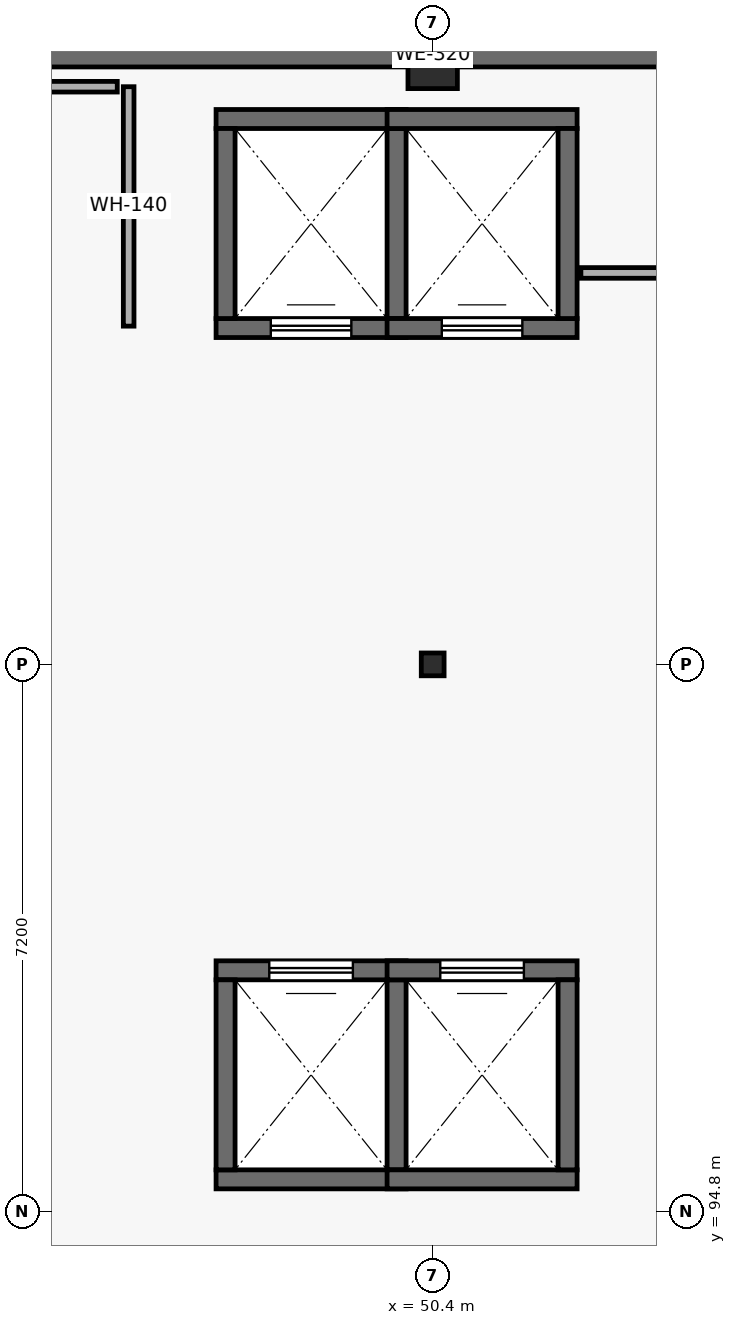
"""IFC4 building model, lengths in metres.
Left out: names, types, materials, properties, quantities, classifications, styles, units other than length and angle.
Written with IfcOpenShell. Run it as: python <this file> out.ifc"""

import sys

from ifc_helpers import new_model, si_unit, direction, frame, frame_2d, origin, origin_2d, place, context, subcontext, project, spatial, rectangle, hollow_rectangle, extrude, element, fill, save


model = new_model("IFC4")
c1 = context("Model", 3, precision=1e-05, world=origin(), true_north=direction((0.0, 1.0)))
c2 = subcontext(c1, "Body", "Model", "MODEL_VIEW")
j1 = project(units=[si_unit("LENGTHUNIT", "METRE"), si_unit("PLANEANGLEUNIT", "RADIAN")], contexts=[c1])
p1 = place(None, origin())
s1 = spatial("IfcSite", under=j1, at=p1, CompositionType="ELEMENT")
p2 = place(p1, origin())
s2 = spatial("IfcBuilding", under=s1, at=p2, CompositionType="ELEMENT")
p3 = place(p2, frame((0.0, 0.0, 44.7)))
s3 = spatial("IfcBuildingStorey", under=s2, at=p3, CompositionType="ELEMENT", Elevation=44.7)
p4 = place(p3, frame((50.4, 102.0, 0.0), z_axis=(0.0, 0.0, 1.0), x_axis=(1.0, 0.0, 0.0)))
e1 = element("IfcColumn", 1, at=p4, inside=s3, PredefinedType="COLUMN", context=c2, shape_type="SweptSolid", body=[
    extrude(hollow_rectangle(XDim=0.3, YDim=0.3, WallThickness=0.012, at=origin_2d()), origin(), (0.0, 0.0, 1.0), 4.8),
])
p5 = place(p3, frame((50.4, 109.9, 0.0), z_axis=(0.0, 0.0, 1.0), x_axis=(1.0, 0.0, 0.0)))
e2 = element("IfcColumn", 2, at=p5, inside=s3, PredefinedType="COLUMN", context=c2, shape_type="SweptSolid", body=[
    extrude(rectangle(XDim=0.65, YDim=0.65, at=origin_2d()), origin(), (0.0, 0.0, 1.0), 8.689),
])
p6 = place(p3, frame((33.6, 110.02, 0.0), z_axis=(0.0, 0.0, 1.0), x_axis=(1.0, 0.0, 0.0)))
e3 = element("IfcWall", 3, at=p6, inside=s3, PredefinedType="SOLIDWALL", context=c2, shape_type="SweptSolid", body=[
    extrude(rectangle(XDim=33.6, YDim=0.32, at=frame_2d((16.8, 0.0))), origin(), (0.0, 0.0, 1.0), 4.58),
])
p7 = place(p3, frame((47.55, 95.225, 0.0), z_axis=(0.0, 0.0, 1.0), x_axis=(1.0, 0.0, 0.0)))
e4 = element("IfcWall", 4, at=p7, inside=s3, PredefinedType="SHEAR", context=c2, shape_type="SweptSolid", body=[
    extrude(rectangle(XDim=2.5, YDim=0.25, at=frame_2d((1.25, 0.0))), origin(), (0.0, 0.0, 1.0), 4.58),
])
p8 = place(p3, frame((50.05, 97.975, 0.0), z_axis=(0.0, 0.0, 1.0), x_axis=(-1.0, 0.0, 0.0)))
e5 = element("IfcWall", 5, at=p8, inside=s3, PredefinedType="SHEAR", context=c2, shape_type="SweptSolid", body=[
    extrude(rectangle(XDim=2.5, YDim=0.25, at=frame_2d((1.25, 0.0))), origin(), (0.0, 0.0, 1.0), 4.58),
])
p9 = place(p8, frame((0.7, 0.0, 0.0)))
e6 = element("IfcOpeningElement", 6, at=p9, cuts=e5, PredefinedType="OPENING", context=c2, shape_type="SweptSolid", body=[
    extrude(rectangle(XDim=1.1, YDim=2.2, at=frame_2d((0.55, 1.1))), frame((0.0, 0.135, 0.0), z_axis=(0.0, -1.0, 0.0), x_axis=(1.0, 0.0, 0.0)), (0.0, 0.0, 1.0), 0.27),
])
for number, where, z_axis, x_axis in (
    (7, (47.675, 95.35, 0.0), (0.0, 0.0, 1.0), (0.0, 1.0, 0.0)),
    (8, (49.925, 97.85, 0.0), (0.0, 0.0, 1.0), (0.0, -1.0, 0.0)),
    (9, (49.8, 95.225, 0.0), (0.0, 0.0, 1.0), (1.0, 0.0, 0.0)),
):
    element("IfcWall", number, at=place(p3, frame(where, z_axis=z_axis, x_axis=x_axis)), inside=s3, PredefinedType="SHEAR", context=c2, shape_type="SweptSolid", body=[
        extrude(rectangle(XDim=2.5, YDim=0.25, at=frame_2d((1.25, 0.0))), origin(), (0.0, 0.0, 1.0), 4.58),
    ])
p10 = place(p3, frame((52.3, 97.975, 0.0), z_axis=(0.0, 0.0, 1.0), x_axis=(-1.0, 0.0, 0.0)))
e10 = element("IfcWall", 10, at=p10, inside=s3, PredefinedType="SHEAR", context=c2, shape_type="SweptSolid", body=[
    extrude(rectangle(XDim=2.5, YDim=0.25, at=frame_2d((1.25, 0.0))), origin(), (0.0, 0.0, 1.0), 4.58),
])
p11 = place(p10, frame((0.7, 0.0, 0.0)))
e11 = element("IfcOpeningElement", 11, at=p11, cuts=e10, PredefinedType="OPENING", context=c2, shape_type="SweptSolid", body=[
    extrude(rectangle(XDim=1.1, YDim=2.2, at=frame_2d((0.55, 1.1))), frame((0.0, 0.135, 0.0), z_axis=(0.0, -1.0, 0.0), x_axis=(1.0, 0.0, 0.0)), (0.0, 0.0, 1.0), 0.27),
])
p12 = place(p3, frame((52.175, 97.85, 0.0), z_axis=(0.0, 0.0, 1.0), x_axis=(0.0, -1.0, 0.0)))
e12 = element("IfcWall", 12, at=p12, inside=s3, PredefinedType="SHEAR", context=c2, shape_type="SweptSolid", body=[
    extrude(rectangle(XDim=2.5, YDim=0.25, at=frame_2d((1.25, 0.0))), origin(), (0.0, 0.0, 1.0), 4.58),
])
p13 = place(p3, frame((47.55, 106.425, 0.0), z_axis=(0.0, 0.0, 1.0), x_axis=(1.0, 0.0, 0.0)))
e13 = element("IfcWall", 13, at=p13, inside=s3, PredefinedType="SHEAR", context=c2, shape_type="SweptSolid", body=[
    extrude(rectangle(XDim=2.5, YDim=0.25, at=frame_2d((1.25, 0.0))), origin(), (0.0, 0.0, 1.0), 4.58),
])
p14 = place(p13, frame((0.72, 0.0, 0.0)))
e14 = element("IfcOpeningElement", 14, at=p14, cuts=e13, PredefinedType="OPENING", context=c2, shape_type="SweptSolid", body=[
    extrude(rectangle(XDim=1.06, YDim=2.2, at=frame_2d((0.53, 1.1))), frame((0.0, 0.135, 0.0), z_axis=(0.0, -1.0, 0.0), x_axis=(1.0, 0.0, 0.0)), (0.0, 0.0, 1.0), 0.27),
])
for number, where, z_axis, x_axis in (
    (15, (50.05, 109.175, 0.0), (0.0, 0.0, 1.0), (-1.0, 0.0, 0.0)),
    (16, (47.675, 106.55, 0.0), (0.0, 0.0, 1.0), (0.0, 1.0, 0.0)),
    (17, (49.925, 109.05, 0.0), (0.0, 0.0, 1.0), (0.0, -1.0, 0.0)),
):
    element("IfcWall", number, at=place(p3, frame(where, z_axis=z_axis, x_axis=x_axis)), inside=s3, PredefinedType="SHEAR", context=c2, shape_type="SweptSolid", body=[
        extrude(rectangle(XDim=2.5, YDim=0.25, at=frame_2d((1.25, 0.0))), origin(), (0.0, 0.0, 1.0), 4.58),
    ])
p15 = place(p3, frame((49.8, 106.425, 0.0), z_axis=(0.0, 0.0, 1.0), x_axis=(1.0, 0.0, 0.0)))
e18 = element("IfcWall", 18, at=p15, inside=s3, PredefinedType="SHEAR", context=c2, shape_type="SweptSolid", body=[
    extrude(rectangle(XDim=2.5, YDim=0.25, at=frame_2d((1.25, 0.0))), origin(), (0.0, 0.0, 1.0), 4.58),
])
p16 = place(p15, frame((0.72, 0.0, 0.0)))
e19 = element("IfcOpeningElement", 19, at=p16, cuts=e18, PredefinedType="OPENING", context=c2, shape_type="SweptSolid", body=[
    extrude(rectangle(XDim=1.06, YDim=2.2, at=frame_2d((0.53, 1.1))), frame((0.0, 0.135, 0.0), z_axis=(0.0, -1.0, 0.0), x_axis=(1.0, 0.0, 0.0)), (0.0, 0.0, 1.0), 0.27),
])
for number, where, z_axis, x_axis in (
    (20, (52.3, 109.175, 0.0), (0.0, 0.0, 1.0), (-1.0, 0.0, 0.0)),
    (21, (52.175, 109.05, 0.0), (0.0, 0.0, 1.0), (0.0, -1.0, 0.0)),
):
    element("IfcWall", number, at=place(p3, frame(where, z_axis=z_axis, x_axis=x_axis)), inside=s3, PredefinedType="SHEAR", context=c2, shape_type="SweptSolid", body=[
        extrude(rectangle(XDim=2.5, YDim=0.25, at=frame_2d((1.25, 0.0))), origin(), (0.0, 0.0, 1.0), 4.58),
    ])
p17 = place(p3, frame((64.35, 107.15, 0.0), z_axis=(0.0, 0.0, 1.0), x_axis=(-1.0, 0.0, 0.0)))
e22 = element("IfcWall", 22, at=p17, inside=s3, PredefinedType="PARTITIONING", context=c2, shape_type="SweptSolid", body=[
    extrude(rectangle(XDim=12.0, YDim=0.14, at=frame_2d((6.0, 0.0))), origin(), (0.0, 0.0, 1.0), 4.58),
])
p18 = place(p17, frame((5.48, 0.0, 0.0)))
e23 = element("IfcOpeningElement", 23, at=p18, cuts=e22, PredefinedType="OPENING", context=c2, shape_type="SweptSolid", body=[
    extrude(rectangle(XDim=1.04, YDim=2.26, at=frame_2d((0.52, 1.13))), frame((0.0, 0.08, 0.0), z_axis=(0.0, -1.0, 0.0), x_axis=(1.0, 0.0, 0.0)), (0.0, 0.0, 1.0), 0.16),
])
p19 = place(p3, frame((46.4, 106.45, 0.0), z_axis=(0.0, 0.0, 1.0), x_axis=(0.0, 1.0, 0.0)))
e24 = element("IfcWall", 24, at=p19, inside=s3, PredefinedType="PARTITIONING", context=c2, shape_type="SweptSolid", body=[
    extrude(rectangle(XDim=3.15, YDim=0.14, at=frame_2d((1.575, 0.0))), origin(), (0.0, 0.0, 1.0), 4.58),
])
p20 = place(p3, frame((46.25, 109.6, 0.0), z_axis=(0.0, 0.0, 1.0), x_axis=(-1.0, 0.0, 0.0)))
e25 = element("IfcWall", 25, at=p20, inside=s3, PredefinedType="PARTITIONING", context=c2, shape_type="SweptSolid", body=[
    extrude(rectangle(XDim=1.915, YDim=0.14, at=frame_2d((0.958, 0.0))), origin(), (0.0, 0.0, 1.0), 4.58),
])
p21 = place(p9, origin())
e26 = element("IfcDoor", 26, at=p21, inside=s3, OperationType="SLIDING_TO_LEFT", PredefinedType="DOOR", context=c2, shape_type="SweptSolid", body=[
    extrude(rectangle(XDim=1.1, YDim=2.2, at=frame_2d((0.55, 1.1))), frame((0.0, 0.025, 0.0), z_axis=(0.0, -1.0, 0.0), x_axis=(1.0, 0.0, 0.0)), (0.0, 0.0, 1.0), 0.05),
])
fill(e6, e26)
p22 = place(p11, origin())
e27 = element("IfcDoor", 27, at=p22, inside=s3, OperationType="SLIDING_TO_LEFT", PredefinedType="DOOR", context=c2, shape_type="SweptSolid", body=[
    extrude(rectangle(XDim=1.1, YDim=2.2, at=frame_2d((0.55, 1.1))), frame((0.0, 0.025, 0.0), z_axis=(0.0, -1.0, 0.0), x_axis=(1.0, 0.0, 0.0)), (0.0, 0.0, 1.0), 0.05),
])
fill(e11, e27)
p23 = place(p14, origin())
e28 = element("IfcDoor", 28, at=p23, inside=s3, OperationType="SLIDING_TO_LEFT", PredefinedType="DOOR", context=c2, shape_type="SweptSolid", body=[
    extrude(rectangle(XDim=1.06, YDim=2.2, at=frame_2d((0.53, 1.1))), frame((0.0, 0.025, 0.0), z_axis=(0.0, -1.0, 0.0), x_axis=(1.0, 0.0, 0.0)), (0.0, 0.0, 1.0), 0.05),
])
fill(e14, e28)
p24 = place(p16, origin())
e29 = element("IfcDoor", 29, at=p24, inside=s3, OperationType="SLIDING_TO_LEFT", PredefinedType="DOOR", context=c2, shape_type="SweptSolid", body=[
    extrude(rectangle(XDim=1.06, YDim=2.2, at=frame_2d((0.53, 1.1))), frame((0.0, 0.025, 0.0), z_axis=(0.0, -1.0, 0.0), x_axis=(1.0, 0.0, 0.0)), (0.0, 0.0, 1.0), 0.05),
])
fill(e19, e29)
save(model, sys.argv[1])
